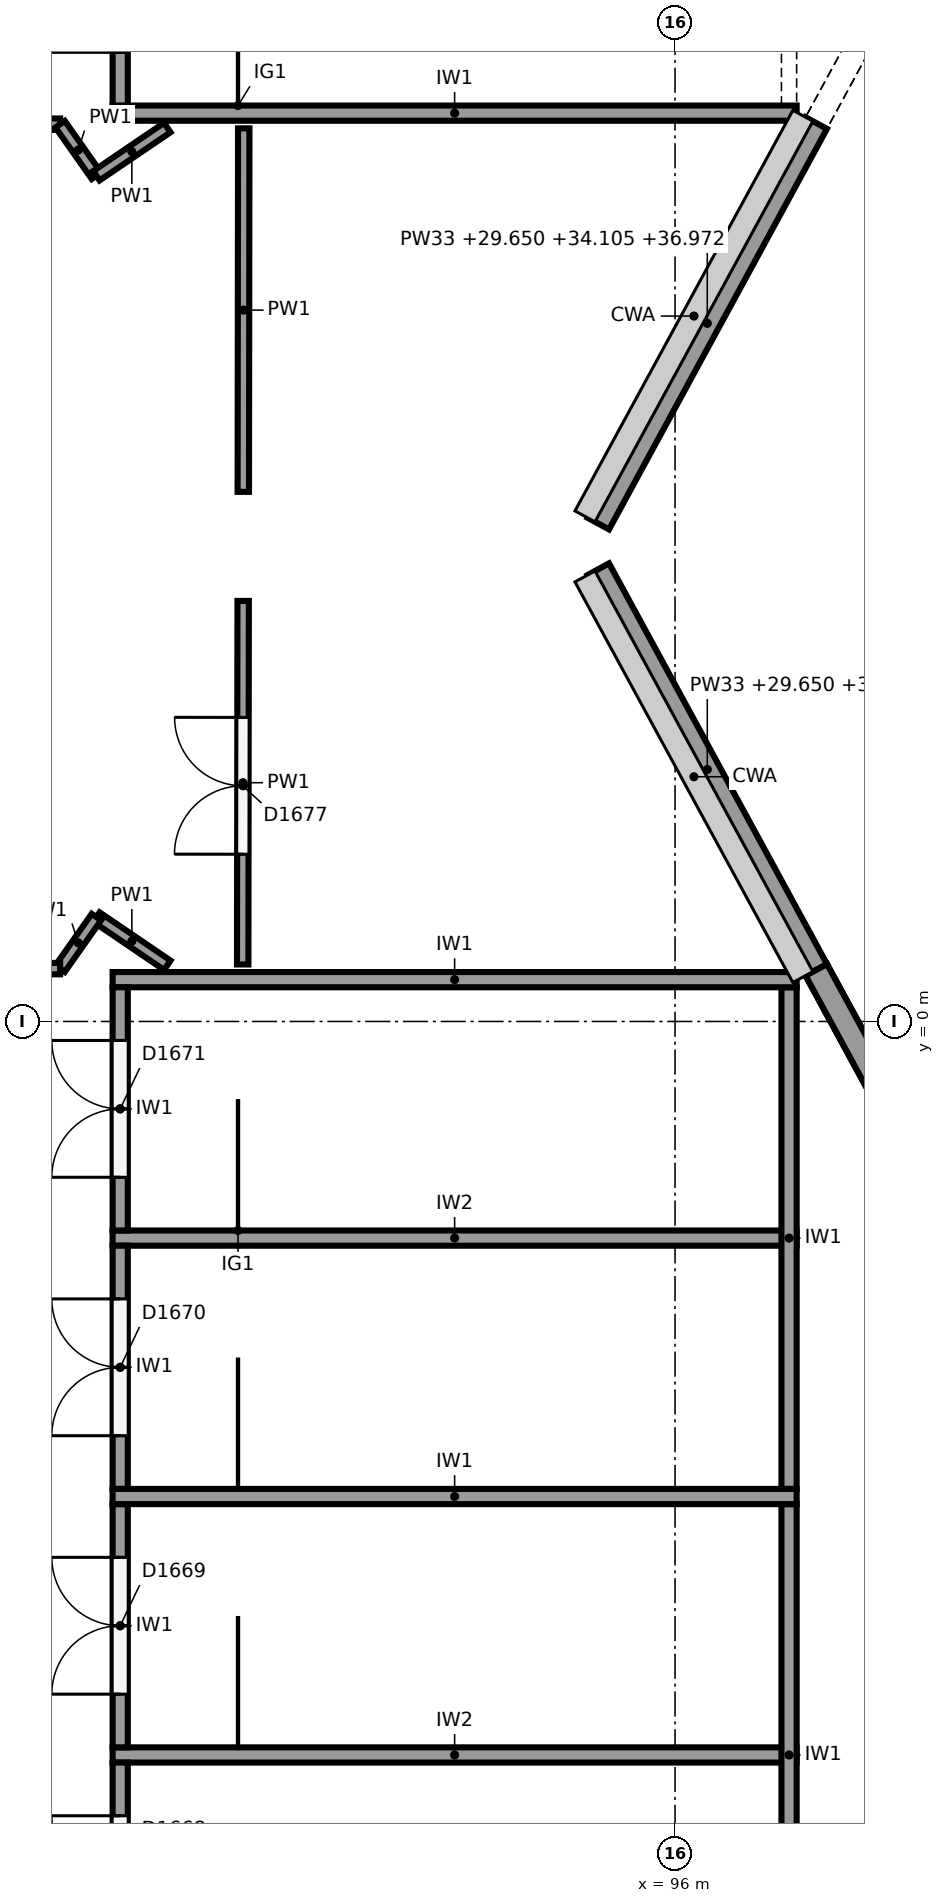
"""IFC4 building model, lengths in metres.
Left out: names, types, materials, properties, quantities, classifications, styles, units other than length and angle.
Written with IfcOpenShell. Run it as: python <this file> out.ifc"""

import sys

from ifc_helpers import new_model, si_unit, direction, frame, frame_2d, origin, origin_2d, place, context, subcontext, project, spatial, polyline, rectangle, circle, outline, extrude, element, fill, save


model = new_model("IFC4")
c1 = context("Model", 3, precision=1e-05, world=origin(), true_north=direction((0.0, 1.0)))
c2 = subcontext(c1, "Body", "Model", "MODEL_VIEW")
j1 = project(units=[si_unit("LENGTHUNIT", "METRE"), si_unit("PLANEANGLEUNIT", "RADIAN")], contexts=[c1])
p1 = place(None, origin())
s1 = spatial("IfcSite", under=j1, at=p1, CompositionType="ELEMENT")
p2 = place(p1, origin())
s2 = spatial("IfcBuilding", under=s1, at=p2, CompositionType="ELEMENT")
p3 = place(p2, frame((0.0, 0.0, 24.0)))
s3 = spatial("IfcBuildingStorey", under=s2, at=p3, CompositionType="ELEMENT", Elevation=24.0)
p4 = place(p3, frame((94.6, 6.25, 0.0), z_axis=(0.0, 0.0, 1.0), x_axis=(1.0, 0.0, 0.0)))
e1 = element("IfcColumn", 1, at=p4, inside=s3, PredefinedType="COLUMN", context=c2, shape_type="SweptSolid", body=[
    extrude(circle(Radius=0.45, at=origin_2d()), origin(), (0.0, 0.0, 1.0), 6.0),
])
p5 = place(p3, frame((101.161, -6.689, 0.0), z_axis=(0.0, 0.0, 1.0), x_axis=(-0.477867771117, -0.878431780691, 0.0)))
e2 = element("IfcWall", 2, at=p5, inside=s3, PredefinedType="SOLIDWALL", context=c2, shape_type="SweptSolid", body=[
    extrude(rectangle(XDim=13.28, YDim=0.32, at=frame_2d((6.64, 0.0))), origin(), (0.0, 0.0, 1.0), 6.0),
])
p6 = place(p5, frame((11.63, 0.0, 1.0)))
e3 = element("IfcOpeningElement", 3, at=p6, cuts=e2, PredefinedType="OPENING", context=c2, shape_type="SweptSolid", body=[
    extrude(rectangle(XDim=0.9, YDim=3.25, at=frame_2d((0.45, 1.625))), frame((0.0, 0.17, 0.0), z_axis=(0.0, -1.0, 0.0), x_axis=(1.0, 0.0, 0.0)), (0.0, 0.0, 1.0), 0.34),
])
p7 = place(p5, frame((9.53, 0.0, 1.0)))
e4 = element("IfcOpeningElement", 4, at=p7, cuts=e2, PredefinedType="OPENING", context=c2, shape_type="SweptSolid", body=[
    extrude(rectangle(XDim=0.9, YDim=3.25, at=frame_2d((0.45, 1.625))), frame((0.0, 0.17, 0.0), z_axis=(0.0, -1.0, 0.0), x_axis=(1.0, 0.0, 0.0)), (0.0, 0.0, 1.0), 0.34),
])
p8 = place(p5, frame((1.13, 0.0, 1.0)))
e5 = element("IfcOpeningElement", 5, at=p8, cuts=e2, PredefinedType="OPENING", context=c2, shape_type="SweptSolid", body=[
    extrude(rectangle(XDim=0.9, YDim=3.25, at=frame_2d((0.45, 1.625))), frame((0.0, 0.17, 0.0), z_axis=(0.0, -1.0, 0.0), x_axis=(1.0, 0.0, 0.0)), (0.0, 0.0, 1.0), 0.34),
])
p9 = place(p3, frame((101.337, -6.785, 6.0), z_axis=(0.0, 0.0, 1.0), x_axis=(-0.477867771117, -0.878431780691, 0.0)))
e6 = element("IfcWall", 6, at=p9, inside=s3, PredefinedType="SOLIDWALL", context=c2, shape_type="SweptSolid", body=[
    extrude(outline(polyline([(0.0, 0.0), (13.28, 0.0), (13.28, 4.105), (0.0, 10.451), (0.0, 0.0)])), frame((0.0, 0.16, 0.0), z_axis=(0.0, -1.0, 0.0), x_axis=(1.0, 0.0, 0.0)), (0.0, 0.0, 1.0), 0.32),
])
p10 = place(p9, frame((9.53, 0.0, 1.6)))
e7 = element("IfcOpeningElement", 7, at=p10, cuts=e6, PredefinedType="OPENING", context=c2, shape_type="SweptSolid", body=[
    extrude(rectangle(XDim=0.9, YDim=3.0, at=frame_2d((0.45, 1.5))), frame((0.0, 0.17, 0.0), z_axis=(0.0, -1.0, 0.0), x_axis=(1.0, 0.0, 0.0)), (0.0, 0.0, 1.0), 0.34),
])
p11 = place(p9, frame((1.13, 0.0, 1.6)))
e8 = element("IfcOpeningElement", 8, at=p11, cuts=e6, PredefinedType="OPENING", context=c2, shape_type="SweptSolid", body=[
    extrude(rectangle(XDim=0.9, YDim=3.0, at=frame_2d((0.45, 1.5))), frame((0.0, 0.17, 0.0), z_axis=(0.0, -1.0, 0.0), x_axis=(1.0, 0.0, 0.0)), (0.0, 0.0, 1.0), 0.34),
])
p12 = place(p3, frame((97.858, 0.68, 0.0), z_axis=(0.0, 0.0, 1.0), x_axis=(0.477865020076, -0.878433277255, 0.0)))
e9 = element("IfcWall", 9, at=p12, inside=s3, PredefinedType="SOLIDWALL", context=c2, shape_type="SweptSolid", body=[
    extrude(rectangle(XDim=7.28, YDim=0.32, at=frame_2d((3.64, 0.0))), origin(), (0.0, 0.0, 1.0), 6.0),
])
p13 = place(p12, frame((5.25, 0.0, 1.0)))
e10 = element("IfcOpeningElement", 10, at=p13, cuts=e9, PredefinedType="OPENING", context=c2, shape_type="SweptSolid", body=[
    extrude(rectangle(XDim=0.9, YDim=3.25, at=frame_2d((0.45, 1.625))), frame((0.0, 0.17, 0.0), z_axis=(0.0, -1.0, 0.0), x_axis=(1.0, 0.0, 0.0)), (0.0, 0.0, 1.0), 0.34),
])
p14 = place(p3, frame((97.858, 0.68, 6.0), z_axis=(0.0, 0.0, 1.0), x_axis=(0.477865020076, -0.878433277255, 0.0)))
e11 = element("IfcWall", 11, at=p14, inside=s3, PredefinedType="SOLIDWALL", context=c2, shape_type="SweptSolid", body=[
    extrude(outline(polyline([(0.0, 0.0), (7.28, 0.0), (7.28, 10.451), (0.0, 6.972), (0.0, 0.0)])), frame((0.0, 0.16, 0.0), z_axis=(0.0, -1.0, 0.0), x_axis=(1.0, 0.0, 0.0)), (0.0, 0.0, 1.0), 0.32),
])
p15 = place(p14, frame((5.25, 0.0, 1.6)))
e12 = element("IfcOpeningElement", 12, at=p15, cuts=e11, PredefinedType="OPENING", context=c2, shape_type="SweptSolid", body=[
    extrude(rectangle(XDim=0.9, YDim=3.0, at=frame_2d((0.45, 1.5))), frame((0.0, 0.17, 0.0), z_axis=(0.0, -1.0, 0.0), x_axis=(1.0, 0.0, 0.0)), (0.0, 0.0, 1.0), 0.34),
])
p16 = place(p3, frame((94.991, 5.95, 5.65), z_axis=(0.0, 0.0, 1.0), x_axis=(0.477871109227, -0.878429964747, 0.0)))
e13 = element("IfcWall", 13, at=p16, inside=s3, PredefinedType="SOLIDWALL", context=c2, shape_type="SweptSolid", body=[
    extrude(outline(polyline([(0.0, 0.0), (6.0, 0.0), (6.0, 7.322), (0.0, 4.455), (0.0, 0.0)])), frame((0.0, 0.16, 0.0), z_axis=(0.0, -1.0, 0.0), x_axis=(1.0, 0.0, 0.0)), (0.0, 0.0, 1.0), 0.32),
])
p17 = place(p3, frame((101.337, 18.215, 0.0), z_axis=(0.0, 0.0, 1.0), x_axis=(-0.477865020076, -0.878433277255, 0.0)))
e14 = element("IfcWall", 14, at=p17, inside=s3, PredefinedType="SOLIDWALL", context=c2, shape_type="SweptSolid", body=[
    extrude(rectangle(XDim=7.28, YDim=0.32, at=frame_2d((3.64, 0.0))), origin(), (0.0, 0.0, 1.0), 6.0),
])
p18 = place(p17, frame((1.13, 0.0, 1.0)))
e15 = element("IfcOpeningElement", 15, at=p18, cuts=e14, PredefinedType="OPENING", context=c2, shape_type="SweptSolid", body=[
    extrude(rectangle(XDim=0.9, YDim=3.25, at=frame_2d((0.45, 1.625))), frame((0.0, 0.17, 0.0), z_axis=(0.0, -1.0, 0.0), x_axis=(1.0, 0.0, 0.0)), (0.0, 0.0, 1.0), 0.34),
])
p19 = place(p3, frame((101.337, 18.215, 6.0), z_axis=(0.0, 0.0, 1.0), x_axis=(-0.477865020076, -0.878433277255, 0.0)))
e16 = element("IfcWall", 16, at=p19, inside=s3, PredefinedType="SOLIDWALL", context=c2, shape_type="SweptSolid", body=[
    extrude(outline(polyline([(0.0, 0.0), (7.28, 0.0), (7.28, 6.972), (0.0, 10.451), (0.0, 0.0)])), frame((0.0, 0.16, 0.0), z_axis=(0.0, -1.0, 0.0), x_axis=(1.0, 0.0, 0.0)), (0.0, 0.0, 1.0), 0.32),
])
p20 = place(p19, frame((1.13, 0.0, 1.6)))
e17 = element("IfcOpeningElement", 17, at=p20, cuts=e16, PredefinedType="OPENING", context=c2, shape_type="SweptSolid", body=[
    extrude(rectangle(XDim=0.9, YDim=3.0, at=frame_2d((0.45, 1.5))), frame((0.0, 0.17, 0.0), z_axis=(0.0, -1.0, 0.0), x_axis=(1.0, 0.0, 0.0)), (0.0, 0.0, 1.0), 0.34),
])
p21 = place(p3, frame((97.858, 11.82, 5.65), z_axis=(0.0, 0.0, 1.0), x_axis=(-0.477871109227, -0.878429964747, 0.0)))
e18 = element("IfcWall", 18, at=p21, inside=s3, PredefinedType="SOLIDWALL", context=c2, shape_type="SweptSolid", body=[
    extrude(outline(polyline([(0.0, 0.0), (6.0, 0.0), (6.0, 4.455), (0.0, 7.322), (0.0, 0.0)])), frame((0.0, 0.16, 0.0), z_axis=(0.0, -1.0, 0.0), x_axis=(1.0, 0.0, 0.0)), (0.0, 0.0, 1.0), 0.32),
])
for number, where, z_axis, x_axis in (
    (19, (97.6, -6.25, 0.0), (0.0, 0.0, 1.0), (-1.0, 0.0, 0.0)),
    (20, (97.6, 0.55, 0.0), (0.0, 0.0, 1.0), (-1.0, 0.0, 0.0)),
):
    element("IfcWall", number, at=place(p3, frame(where, z_axis=z_axis, x_axis=x_axis)), inside=s3, PredefinedType="SHEAR", context=c2, shape_type="SweptSolid", body=[
        extrude(rectangle(XDim=9.0, YDim=0.2, at=frame_2d((4.5, 0.0))), origin(), (0.0, 0.0, 1.0), 5.75),
    ])
for number, where, z_axis, x_axis in (
    (21, (97.5, -12.95, 0.0), (0.0, 0.0, 1.0), (0.0, 1.0, 0.0)),
    (22, (97.5, -6.15, 0.0), (0.0, 0.0, 1.0), (0.0, 1.0, 0.0)),
):
    element("IfcWall", number, at=place(p3, frame(where, z_axis=z_axis, x_axis=x_axis)), inside=s3, PredefinedType="SHEAR", context=c2, shape_type="SweptSolid", body=[
        extrude(rectangle(XDim=6.6, YDim=0.2, at=frame_2d((3.3, 0.0))), origin(), (0.0, 0.0, 1.0), 5.75),
    ])
for number, where, z_axis, x_axis in (
    (23, (97.6, -9.65, 0.0), (0.0, 0.0, 1.0), (-1.0, 0.0, 0.0)),
    (24, (97.6, -2.85, 0.0), (0.0, 0.0, 1.0), (-1.0, 0.0, 0.0)),
):
    element("IfcWall", number, at=place(p3, frame(where, z_axis=z_axis, x_axis=x_axis)), inside=s3, PredefinedType="SHEAR", context=c2, shape_type="SweptSolid", body=[
        extrude(rectangle(XDim=9.0, YDim=0.2, at=frame_2d((4.5, 0.0))), origin(), (0.0, 0.0, 1.0), 5.75),
    ])
p22 = place(p3, frame((88.7, -12.95, 0.0), z_axis=(0.0, 0.0, 1.0), x_axis=(0.0, 1.0, 0.0)))
e25 = element("IfcWall", 25, at=p22, inside=s3, PredefinedType="SHEAR", context=c2, shape_type="SweptSolid", body=[
    extrude(rectangle(XDim=3.2, YDim=0.2, at=frame_2d((1.6, 0.0))), origin(), (0.0, 0.0, 1.0), 5.75),
])
p23 = place(p22, frame((0.7, 0.0, 0.0)))
e26 = element("IfcOpeningElement", 26, at=p23, cuts=e25, PredefinedType="OPENING", context=c2, shape_type="SweptSolid", body=[
    extrude(rectangle(XDim=1.8, YDim=2.1, at=frame_2d((0.9, 1.05))), frame((0.0, 0.11, 0.0), z_axis=(0.0, -1.0, 0.0), x_axis=(1.0, 0.0, 0.0)), (0.0, 0.0, 1.0), 0.22),
])
p24 = place(p3, frame((88.7, -9.55, 0.0), z_axis=(0.0, 0.0, 1.0), x_axis=(0.0, 1.0, 0.0)))
e27 = element("IfcWall", 27, at=p24, inside=s3, PredefinedType="SHEAR", context=c2, shape_type="SweptSolid", body=[
    extrude(rectangle(XDim=3.2, YDim=0.2, at=frame_2d((1.6, 0.0))), origin(), (0.0, 0.0, 1.0), 5.75),
])
p25 = place(p24, frame((0.7, 0.0, 0.0)))
e28 = element("IfcOpeningElement", 28, at=p25, cuts=e27, PredefinedType="OPENING", context=c2, shape_type="SweptSolid", body=[
    extrude(rectangle(XDim=1.8, YDim=2.1, at=frame_2d((0.9, 1.05))), frame((0.0, 0.11, 0.0), z_axis=(0.0, -1.0, 0.0), x_axis=(1.0, 0.0, 0.0)), (0.0, 0.0, 1.0), 0.22),
])
p26 = place(p3, frame((88.7, -6.15, 0.0), z_axis=(0.0, 0.0, 1.0), x_axis=(0.0, 1.0, 0.0)))
e29 = element("IfcWall", 29, at=p26, inside=s3, PredefinedType="SHEAR", context=c2, shape_type="SweptSolid", body=[
    extrude(rectangle(XDim=3.2, YDim=0.2, at=frame_2d((1.6, 0.0))), origin(), (0.0, 0.0, 1.0), 5.75),
])
p27 = place(p26, frame((0.7, 0.0, 0.0)))
e30 = element("IfcOpeningElement", 30, at=p27, cuts=e29, PredefinedType="OPENING", context=c2, shape_type="SweptSolid", body=[
    extrude(rectangle(XDim=1.8, YDim=2.1, at=frame_2d((0.9, 1.05))), frame((0.0, 0.11, 0.0), z_axis=(0.0, -1.0, 0.0), x_axis=(1.0, 0.0, 0.0)), (0.0, 0.0, 1.0), 0.22),
])
p28 = place(p3, frame((88.7, -2.75, 0.0), z_axis=(0.0, 0.0, 1.0), x_axis=(0.0, 1.0, 0.0)))
e31 = element("IfcWall", 31, at=p28, inside=s3, PredefinedType="SHEAR", context=c2, shape_type="SweptSolid", body=[
    extrude(rectangle(XDim=3.2, YDim=0.2, at=frame_2d((1.6, 0.0))), origin(), (0.0, 0.0, 1.0), 5.75),
])
p29 = place(p28, frame((0.7, 0.0, 0.0)))
e32 = element("IfcOpeningElement", 32, at=p29, cuts=e31, PredefinedType="OPENING", context=c2, shape_type="SweptSolid", body=[
    extrude(rectangle(XDim=1.8, YDim=2.1, at=frame_2d((0.9, 1.05))), frame((0.0, 0.11, 0.0), z_axis=(0.0, -1.0, 0.0), x_axis=(1.0, 0.0, 0.0)), (0.0, 0.0, 1.0), 0.22),
])
p30 = place(p3, frame((97.6, 11.95, 0.0), z_axis=(0.0, 0.0, 1.0), x_axis=(-1.0, 0.0, 0.0)))
e33 = element("IfcWall", 33, at=p30, inside=s3, PredefinedType="SHEAR", context=c2, shape_type="SweptSolid", body=[
    extrude(rectangle(XDim=9.0, YDim=0.2, at=frame_2d((4.5, 0.0))), origin(), (0.0, 0.0, 1.0), 5.75),
])
p31 = place(p3, frame((97.5, 12.05, 0.0), z_axis=(0.0, 0.0, 1.0), x_axis=(0.0, 1.0, 0.0)))
e34 = element("IfcWall", 34, at=p31, inside=s3, PredefinedType="SHEAR", context=c2, shape_type="SweptSolid", body=[
    extrude(rectangle(XDim=6.6, YDim=0.2, at=frame_2d((3.3, 0.0))), origin(), (0.0, 0.0, 1.0), 5.75),
])
p32 = place(p3, frame((88.7, 12.05, 0.0), z_axis=(0.0, 0.0, 1.0), x_axis=(0.0, 1.0, 0.0)))
e35 = element("IfcWall", 35, at=p32, inside=s3, PredefinedType="SHEAR", context=c2, shape_type="SweptSolid", body=[
    extrude(rectangle(XDim=3.2, YDim=0.2, at=frame_2d((1.6, 0.0))), origin(), (0.0, 0.0, 1.0), 5.75),
])
p33 = place(p32, frame((0.7, 0.0, 0.0)))
e36 = element("IfcOpeningElement", 36, at=p33, cuts=e35, PredefinedType="OPENING", context=c2, shape_type="SweptSolid", body=[
    extrude(rectangle(XDim=1.8, YDim=2.1, at=frame_2d((0.9, 1.05))), frame((0.0, 0.11, 0.0), z_axis=(0.0, -1.0, 0.0), x_axis=(1.0, 0.0, 0.0)), (0.0, 0.0, 1.0), 0.22),
])
p34 = place(p3, frame((90.312, 0.75, 0.0), z_axis=(0.0, 0.0, 1.0), x_axis=(0.001276160268, 0.999999185707, 0.0)))
e37 = element("IfcWall", 37, at=p34, inside=s3, PredefinedType="PARTITIONING", context=c2, shape_type="SweptSolid", body=[
    extrude(rectangle(XDim=4.783, YDim=0.15, at=frame_2d((2.391, 0.0))), origin(), (0.0, 0.0, 1.0), 5.4),
])
p35 = place(p34, frame((1.45, 0.0, 0.0)))
e38 = element("IfcOpeningElement", 38, at=p35, cuts=e37, PredefinedType="OPENING", context=c2, shape_type="SweptSolid", body=[
    extrude(rectangle(XDim=1.8, YDim=2.1, at=frame_2d((0.9, 1.05))), frame((0.0, 0.085, 0.0), z_axis=(0.0, -1.0, 0.0), x_axis=(1.0, 0.0, 0.0)), (0.0, 0.0, 1.0), 0.17),
])
p36 = place(p3, frame((90.32, 6.967, 0.0), z_axis=(0.0, 0.0, 1.0), x_axis=(0.001225113935, 0.999999249548, 0.0)))
e39 = element("IfcWall", 39, at=p36, inside=s3, PredefinedType="PARTITIONING", context=c2, shape_type="SweptSolid", body=[
    extrude(rectangle(XDim=4.783, YDim=0.15, at=frame_2d((2.391, 0.0))), origin(), (0.0, 0.0, 1.0), 5.4),
])
p37 = place(p3, frame((89.32, 0.74, 0.0), z_axis=(0.0, 0.0, 1.0), x_axis=(-0.827055308354, 0.562120553728, 0.0)))
e40 = element("IfcWall", 40, at=p37, inside=s3, PredefinedType="PARTITIONING", context=c2, shape_type="SweptSolid", body=[
    extrude(rectangle(XDim=1.128, YDim=0.15, at=frame_2d((0.564, 0.0))), origin(), (0.0, 0.0, 1.0), 5.4),
])
p38 = place(p3, frame((88.387, 1.374, 0.0), z_axis=(0.0, 0.0, 1.0), x_axis=(-0.575376756214, -0.817888493872, 0.0)))
e41 = element("IfcWall", 41, at=p38, inside=s3, PredefinedType="PARTITIONING", context=c2, shape_type="SweptSolid", body=[
    extrude(rectangle(XDim=0.83, YDim=0.15, at=frame_2d((0.415, 0.0))), origin(), (0.0, 0.0, 1.0), 5.4),
])
p39 = place(p3, frame((87.909, 0.695, 0.0), z_axis=(0.0, 0.0, 1.0), x_axis=(-1.0, 0.0, 0.0)))
e42 = element("IfcWall", 42, at=p39, inside=s3, PredefinedType="PARTITIONING", context=c2, shape_type="SweptSolid", body=[
    extrude(rectangle(XDim=3.704, YDim=0.15, at=frame_2d((1.852, 0.0))), origin(), (0.0, 0.0, 1.0), 5.4),
])
p40 = place(p39, frame((0.65, 0.0, 0.0)))
e43 = element("IfcOpeningElement", 43, at=p40, cuts=e42, PredefinedType="OPENING", context=c2, shape_type="SweptSolid", body=[
    extrude(rectangle(XDim=1.8, YDim=2.1, at=frame_2d((0.9, 1.05))), frame((0.0, 0.085, 0.0), z_axis=(0.0, -1.0, 0.0), x_axis=(1.0, 0.0, 0.0)), (0.0, 0.0, 1.0), 0.17),
])
p41 = place(p3, frame((82.516, 11.805, 0.0), z_axis=(0.0, 0.0, 1.0), x_axis=(1.0, 0.0, 0.0)))
e44 = element("IfcWall", 44, at=p41, inside=s3, PredefinedType="PARTITIONING", context=c2, shape_type="SweptSolid", body=[
    extrude(rectangle(XDim=5.394, YDim=0.15, at=frame_2d((2.697, 0.0))), origin(), (0.0, 0.0, 1.0), 5.4),
])
p42 = place(p41, frame((1.75, 0.0, 0.0)))
e45 = element("IfcOpeningElement", 45, at=p42, cuts=e44, PredefinedType="OPENING", context=c2, shape_type="SweptSolid", body=[
    extrude(rectangle(XDim=1.8, YDim=2.1, at=frame_2d((0.9, 1.05))), frame((0.0, 0.085, 0.0), z_axis=(0.0, -1.0, 0.0), x_axis=(1.0, 0.0, 0.0)), (0.0, 0.0, 1.0), 0.17),
])
p43 = place(p3, frame((87.909, 11.805, 0.0), z_axis=(0.0, 0.0, 1.0), x_axis=(0.575573582652, -0.81774999294, 0.0)))
e46 = element("IfcWall", 46, at=p43, inside=s3, PredefinedType="PARTITIONING", context=c2, shape_type="SweptSolid", body=[
    extrude(rectangle(XDim=0.83, YDim=0.15, at=frame_2d((0.415, 0.0))), origin(), (0.0, 0.0, 1.0), 5.4),
])
p44 = place(p3, frame((88.387, 11.126, 0.0), z_axis=(0.0, 0.0, 1.0), x_axis=(0.827055308354, 0.562120553728, 0.0)))
e47 = element("IfcWall", 47, at=p44, inside=s3, PredefinedType="PARTITIONING", context=c2, shape_type="SweptSolid", body=[
    extrude(rectangle(XDim=1.128, YDim=0.15, at=frame_2d((0.564, 0.0))), origin(), (0.0, 0.0, 1.0), 5.4),
])
p45 = place(p23, origin())
e48 = element("IfcDoor", 48, at=p45, inside=s3, OperationType="DOUBLE_DOOR_SINGLE_SWING", PredefinedType="DOOR", context=c2, shape_type="SweptSolid", body=[
    extrude(rectangle(XDim=1.8, YDim=2.1, at=frame_2d((0.9, 1.05))), frame((0.0, 0.025, 0.0), z_axis=(0.0, -1.0, 0.0), x_axis=(1.0, 0.0, 0.0)), (0.0, 0.0, 1.0), 0.05),
])
fill(e26, e48)
p46 = place(p25, origin())
e49 = element("IfcDoor", 49, at=p46, inside=s3, OperationType="DOUBLE_DOOR_SINGLE_SWING", PredefinedType="DOOR", context=c2, shape_type="SweptSolid", body=[
    extrude(rectangle(XDim=1.8, YDim=2.1, at=frame_2d((0.9, 1.05))), frame((0.0, 0.025, 0.0), z_axis=(0.0, -1.0, 0.0), x_axis=(1.0, 0.0, 0.0)), (0.0, 0.0, 1.0), 0.05),
])
fill(e28, e49)
p47 = place(p27, origin())
e50 = element("IfcDoor", 50, at=p47, inside=s3, OperationType="DOUBLE_DOOR_SINGLE_SWING", PredefinedType="DOOR", context=c2, shape_type="SweptSolid", body=[
    extrude(rectangle(XDim=1.8, YDim=2.1, at=frame_2d((0.9, 1.05))), frame((0.0, 0.025, 0.0), z_axis=(0.0, -1.0, 0.0), x_axis=(1.0, 0.0, 0.0)), (0.0, 0.0, 1.0), 0.05),
])
fill(e30, e50)
p48 = place(p29, origin())
e51 = element("IfcDoor", 51, at=p48, inside=s3, OperationType="DOUBLE_DOOR_SINGLE_SWING", PredefinedType="DOOR", context=c2, shape_type="SweptSolid", body=[
    extrude(rectangle(XDim=1.8, YDim=2.1, at=frame_2d((0.9, 1.05))), frame((0.0, 0.025, 0.0), z_axis=(0.0, -1.0, 0.0), x_axis=(1.0, 0.0, 0.0)), (0.0, 0.0, 1.0), 0.05),
])
fill(e32, e51)
p49 = place(p33, origin())
e52 = element("IfcDoor", 52, at=p49, inside=s3, OperationType="DOUBLE_DOOR_SINGLE_SWING", PredefinedType="DOOR", context=c2, shape_type="SweptSolid", body=[
    extrude(rectangle(XDim=1.8, YDim=2.1, at=frame_2d((0.9, 1.05))), frame((0.0, 0.025, 0.0), z_axis=(0.0, -1.0, 0.0), x_axis=(1.0, 0.0, 0.0)), (0.0, 0.0, 1.0), 0.05),
])
fill(e36, e52)
p50 = place(p35, origin())
e53 = element("IfcDoor", 53, at=p50, inside=s3, OperationType="DOUBLE_DOOR_SINGLE_SWING", PredefinedType="DOOR", context=c2, shape_type="SweptSolid", body=[
    extrude(rectangle(XDim=1.8, YDim=2.1, at=frame_2d((0.9, 1.05))), frame((0.0, 0.025, 0.0), z_axis=(0.0, -1.0, 0.0), x_axis=(1.0, 0.0, 0.0)), (0.0, 0.0, 1.0), 0.05),
])
fill(e38, e53)
save(model, sys.argv[1])
